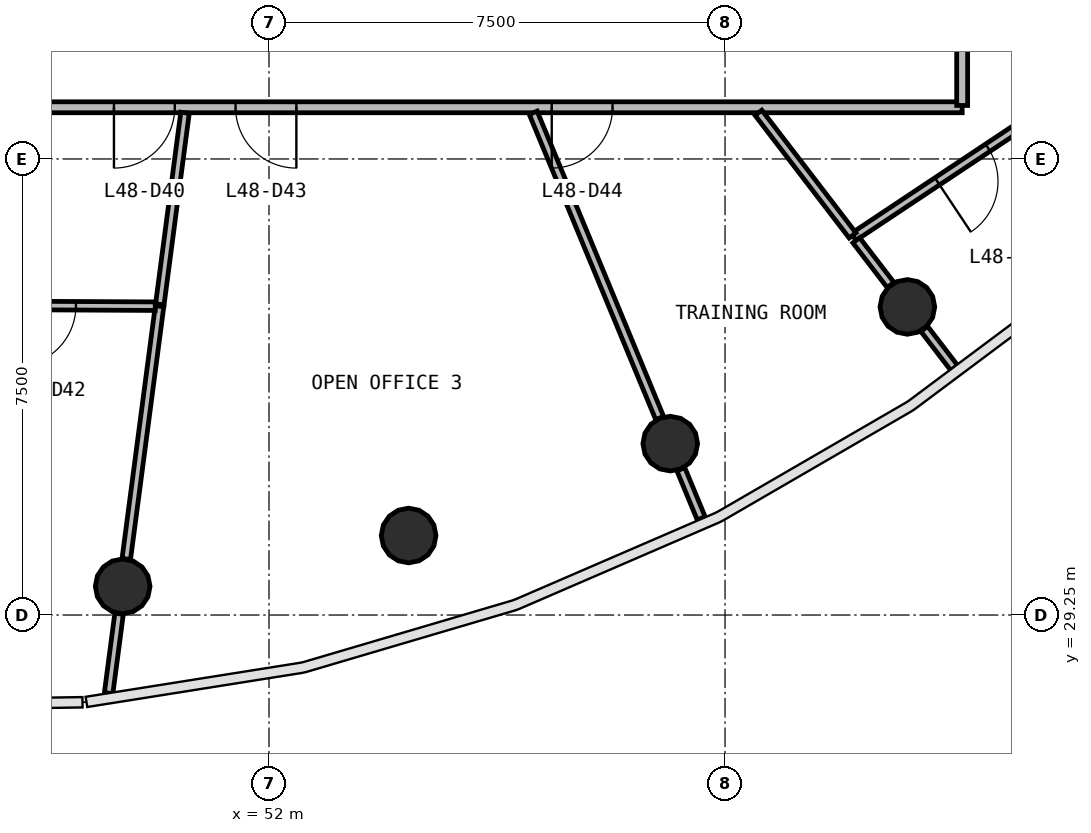
"""IFC4 building model, lengths in metres.
Left out: names, types, materials, properties, quantities, classifications, styles, units other than length and angle.
Written with IfcOpenShell. Run it as: python <this file> out.ifc"""

import sys

from ifc_helpers import new_model, si_unit, direction, frame, frame_2d, origin, origin_2d, place, context, subcontext, project, spatial, rectangle, circle, extrude, source, transform, mapped, element, fill, save


model = new_model("IFC4")
c1 = context("Model", 3, precision=1e-05, world=origin(), true_north=direction((0.0, 1.0)))
c2 = subcontext(c1, "Body", "Model", "MODEL_VIEW")
j1 = project(units=[si_unit("LENGTHUNIT", "METRE"), si_unit("PLANEANGLEUNIT", "RADIAN")], contexts=[c1])
p1 = place(None, origin())
s1 = spatial("IfcSite", under=j1, at=p1, CompositionType="ELEMENT")
p2 = place(p1, origin())
s2 = spatial("IfcBuilding", under=s1, at=p2, CompositionType="ELEMENT")
p3 = place(p2, frame((0.0, 0.0, 199.4)))
s3 = spatial("IfcBuildingStorey", under=s2, at=p3, CompositionType="ELEMENT", Elevation=199.4)
m1 = source(origin(), c2, "Body", "SweptSolid", [
    extrude(circle(Radius=0.45, at=origin_2d()), origin(), (0.0, 0.0, 1.0), 3.9),
])
for number, where, z_axis, x_axis in (
    (1, (49.594, 29.722, 0.0), (0.0, 0.0, 1.0), (1.0, 0.0, 0.0)),
    (2, (54.296, 30.558, 0.0), (0.0, 0.0, 1.0), (1.0, 0.0, 0.0)),
    (3, (58.599, 32.069, 0.0), (0.0, 0.0, 1.0), (1.0, 0.0, 0.0)),
    (4, (62.499, 34.317, 0.0), (0.0, 0.0, 1.0), (1.0, 0.0, 0.0)),
):
    element("IfcColumn", number, at=place(p3, frame(where, z_axis=z_axis, x_axis=x_axis)), inside=s3, PredefinedType="COLUMN", context=c2, shape_type="MappedRepresentation", body=[
        mapped(m1, transform((0.0, 0.0, 0.0), scale=1.0)),
    ])
p4 = place(p3, frame((63.4, 37.6, 0.0), z_axis=(0.0, 0.0, 1.0), x_axis=(-1.0, 0.0, 0.0)))
e5 = element("IfcWall", 5, at=p4, inside=s3, PredefinedType="PARTITIONING", context=c2, shape_type="SweptSolid", body=[
    extrude(rectangle(XDim=22.8, YDim=0.18, at=frame_2d((11.4, 0.0))), origin(), (0.0, 0.0, 1.0), 2.88),
])
p5 = place(p4, frame((12.95, 0.0, 0.0)))
e6 = element("IfcOpeningElement", 6, at=p5, cuts=e5, PredefinedType="OPENING", context=c2, shape_type="SweptSolid", body=[
    extrude(rectangle(XDim=1.0, YDim=2.1, at=frame_2d((0.5, 1.05))), frame((0.0, 0.1, 0.0), z_axis=(0.0, -1.0, 0.0), x_axis=(1.0, 0.0, 0.0)), (0.0, 0.0, 1.0), 0.2),
])
p6 = place(p4, frame((10.95, 0.0, 0.0)))
e7 = element("IfcOpeningElement", 7, at=p6, cuts=e5, PredefinedType="OPENING", context=c2, shape_type="SweptSolid", body=[
    extrude(rectangle(XDim=1.0, YDim=2.1, at=frame_2d((0.5, 1.05))), frame((0.0, 0.1, 0.0), z_axis=(0.0, -1.0, 0.0), x_axis=(1.0, 0.0, 0.0)), (0.0, 0.0, 1.0), 0.2),
])
p7 = place(p4, frame((5.75, 0.0, 0.0)))
e8 = element("IfcOpeningElement", 8, at=p7, cuts=e5, PredefinedType="OPENING", context=c2, shape_type="SweptSolid", body=[
    extrude(rectangle(XDim=1.0, YDim=2.1, at=frame_2d((0.5, 1.05))), frame((0.0, 0.1, 0.0), z_axis=(0.0, -1.0, 0.0), x_axis=(1.0, 0.0, 0.0)), (0.0, 0.0, 1.0), 0.2),
])
p8 = place(p3, frame((63.4, 58.37, 0.0), z_axis=(0.0, 0.0, 1.0), x_axis=(0.0, -1.0, 0.0)))
e9 = element("IfcWall", 9, at=p8, inside=s3, PredefinedType="PARTITIONING", context=c2, shape_type="SweptSolid", body=[
    extrude(rectangle(XDim=20.74, YDim=0.18, at=frame_2d((10.37, 0.0))), origin(), (0.0, 0.0, 1.0), 2.88),
])
p9 = place(p8, frame((9.99, 0.0, 0.0)))
e10 = element("IfcOpeningElement", 10, at=p9, cuts=e9, PredefinedType="OPENING", context=c2, shape_type="SweptSolid", body=[
    extrude(rectangle(XDim=0.9, YDim=2.1, at=frame_2d((0.45, 1.05))), frame((0.0, 0.1, 0.0), z_axis=(0.0, -1.0, 0.0), x_axis=(1.0, 0.0, 0.0)), (0.0, 0.0, 1.0), 0.2),
])
p10 = place(p8, frame((7.79, 0.0, 0.0)))
e11 = element("IfcOpeningElement", 11, at=p10, cuts=e9, PredefinedType="OPENING", context=c2, shape_type="SweptSolid", body=[
    extrude(rectangle(XDim=0.9, YDim=2.1, at=frame_2d((0.45, 1.05))), frame((0.0, 0.1, 0.0), z_axis=(0.0, -1.0, 0.0), x_axis=(1.0, 0.0, 0.0)), (0.0, 0.0, 1.0), 0.2),
])
p11 = place(p8, frame((4.29, 0.0, 0.0)))
e12 = element("IfcOpeningElement", 12, at=p11, cuts=e9, PredefinedType="OPENING", context=c2, shape_type="SweptSolid", body=[
    extrude(rectangle(XDim=1.0, YDim=2.1, at=frame_2d((0.5, 1.05))), frame((0.0, 0.1, 0.0), z_axis=(0.0, -1.0, 0.0), x_axis=(1.0, 0.0, 0.0)), (0.0, 0.0, 1.0), 0.2),
])
p12 = place(p8, frame((12.09, 0.0, 0.0)))
e13 = element("IfcOpeningElement", 13, at=p12, cuts=e9, PredefinedType="OPENING", context=c2, shape_type="SweptSolid", body=[
    extrude(rectangle(XDim=1.0, YDim=2.1, at=frame_2d((0.5, 1.05))), frame((0.0, 0.1, 0.0), z_axis=(0.0, -1.0, 0.0), x_axis=(1.0, 0.0, 0.0)), (0.0, 0.0, 1.0), 0.2),
])
p13 = place(p3, frame((56.345, 37.51, 0.0), z_axis=(0.0, 0.0, 1.0), x_axis=(0.382655972885, -0.923890906122, 0.0)))
e14 = element("IfcWall", 14, at=p13, inside=s3, PredefinedType="PARTITIONING", context=c2, shape_type="SweptSolid", body=[
    extrude(rectangle(XDim=5.435, YDim=0.14, at=frame_2d((2.717, 0.0))), origin(), (0.0, 0.0, 1.0), 2.88),
])
p14 = place(p3, frame((65.214, 37.861, 0.0), z_axis=(0.0, 0.0, 1.0), x_axis=(-0.832762432558, -0.553630500353, 0.0)))
e15 = element("IfcWall", 15, at=p14, inside=s3, PredefinedType="PARTITIONING", context=c2, shape_type="SweptSolid", body=[
    extrude(rectangle(XDim=4.321, YDim=0.14, at=frame_2d((2.16, 0.0))), origin(), (0.0, 0.0, 1.0), 2.88),
])
p15 = place(p14, frame((1.671, 0.0, 0.0)))
e16 = element("IfcOpeningElement", 16, at=p15, cuts=e15, PredefinedType="OPENING", context=c2, shape_type="SweptSolid", body=[
    extrude(rectangle(XDim=1.0, YDim=2.1, at=frame_2d((0.5, 1.05))), frame((0.0, 0.08, 0.0), z_axis=(0.0, -1.0, 0.0), x_axis=(1.0, 0.0, 0.0)), (0.0, 0.0, 1.0), 0.16),
])
p16 = place(p3, frame((50.2, 34.329, 0.0), z_axis=(0.0, 0.0, 1.0), x_axis=(-0.13056900495, -0.991439224031, 0.0)))
e17 = element("IfcWall", 17, at=p16, inside=s3, PredefinedType="PARTITIONING", context=c2, shape_type="SweptSolid", body=[
    extrude(rectangle(XDim=4.192, YDim=0.14, at=frame_2d((2.096, 0.0))), origin(), (0.0, 0.0, 1.0), 2.88),
])
p17 = place(p3, frame((50.13, 34.329, 0.0), z_axis=(0.0, 0.0, 1.0), x_axis=(-0.999987464445, 0.005007090308, 0.0)))
e18 = element("IfcWall", 18, at=p17, inside=s3, PredefinedType="PARTITIONING", context=c2, shape_type="SweptSolid", body=[
    extrude(rectangle(XDim=3.754, YDim=0.14, at=frame_2d((1.877, 0.0))), origin(), (0.0, 0.0, 1.0), 2.88),
])
p18 = place(p17, frame((1.304, 0.0, 0.0)))
e19 = element("IfcOpeningElement", 19, at=p18, cuts=e18, PredefinedType="OPENING", context=c2, shape_type="SweptSolid", body=[
    extrude(rectangle(XDim=1.0, YDim=2.1, at=frame_2d((0.5, 1.05))), frame((0.0, 0.08, 0.0), z_axis=(0.0, -1.0, 0.0), x_axis=(1.0, 0.0, 0.0)), (0.0, 0.0, 1.0), 0.16),
])
p19 = place(p3, frame((50.619, 37.51, 0.0), z_axis=(0.0, 0.0, 1.0), x_axis=(-0.130488286991, -0.991449850955, 0.0)))
e20 = element("IfcWall", 20, at=p19, inside=s3, PredefinedType="PARTITIONING", context=c2, shape_type="SweptSolid", body=[
    extrude(rectangle(XDim=3.179, YDim=0.14, at=frame_2d((1.589, 0.0))), origin(), (0.0, 0.0, 1.0), 2.88),
])
p20 = place(p3, frame((60.049, 37.51, 0.0), z_axis=(0.0, 0.0, 1.0), x_axis=(0.608703571787, -0.793397732348, 0.0)))
e21 = element("IfcWall", 21, at=p20, inside=s3, PredefinedType="PARTITIONING", context=c2, shape_type="SweptSolid", body=[
    extrude(rectangle(XDim=2.543, YDim=0.14, at=frame_2d((1.271, 0.0))), origin(), (0.0, 0.0, 1.0), 2.88),
])
p21 = place(p3, frame((49.534, 29.271, 0.0), z_axis=(0.0, 0.0, 1.0), x_axis=(-0.13056005306, -0.991440402921, 0.0)))
e22 = element("IfcWall", 22, at=p21, inside=s3, PredefinedType="PARTITIONING", context=c2, shape_type="SweptSolid", body=[
    extrude(rectangle(XDim=1.316, YDim=0.14, at=frame_2d((0.658, 0.0))), origin(), (0.0, 0.0, 1.0), 2.88),
])
p22 = place(p3, frame((61.658, 35.413, 0.0), z_axis=(0.0, 0.0, 1.0), x_axis=(0.60873011284, -0.79337736905, 0.0)))
e23 = element("IfcWall", 23, at=p22, inside=s3, PredefinedType="PARTITIONING", context=c2, shape_type="SweptSolid", body=[
    extrude(rectangle(XDim=0.927, YDim=0.14, at=frame_2d((0.463, 0.0))), origin(), (0.0, 0.0, 1.0), 2.88),
])
p23 = place(p3, frame((58.773, 31.648, 0.0), z_axis=(0.0, 0.0, 1.0), x_axis=(0.382672260774, -0.923884159857, 0.0)))
e24 = element("IfcWall", 24, at=p23, inside=s3, PredefinedType="PARTITIONING", context=c2, shape_type="SweptSolid", body=[
    extrude(rectangle(XDim=0.875, YDim=0.14, at=frame_2d((0.438, 0.0))), origin(), (0.0, 0.0, 1.0), 2.88),
])
p24 = place(p3, frame((62.776, 33.956, 0.0), z_axis=(0.0, 0.0, 1.0), x_axis=(0.60901253632, -0.793160595721, 0.0)))
e25 = element("IfcWall", 25, at=p24, inside=s3, PredefinedType="PARTITIONING", context=c2, shape_type="SweptSolid", body=[
    extrude(rectangle(XDim=0.811, YDim=0.14, at=frame_2d((0.406, 0.0))), origin(), (0.0, 0.0, 1.0), 2.88),
])
m2 = source(origin(), c2, "Body", "SweptSolid", [
    extrude(rectangle(XDim=1.0, YDim=2.1, at=frame_2d((0.5, 1.05))), frame((0.0, 0.025, 0.0), z_axis=(0.0, -1.0, 0.0), x_axis=(1.0, 0.0, 0.0)), (0.0, 0.0, 1.0), 0.05),
])
p25 = place(p5, origin())
e26 = element("IfcDoor", 26, at=p25, inside=s3, OperationType="SINGLE_SWING_RIGHT", PredefinedType="DOOR", context=c2, shape_type="MappedRepresentation", body=[
    mapped(m2, transform((0.0, 0.0, 0.0), scale=1.0)),
])
fill(e6, e26)
p26 = place(p18, origin())
e27 = element("IfcDoor", 27, at=p26, inside=s3, OperationType="SINGLE_SWING_RIGHT", PredefinedType="DOOR", context=c2, shape_type="MappedRepresentation", body=[
    mapped(m2, transform((0.0, 0.0, 0.0), scale=1.0)),
])
fill(e19, e27)
p27 = place(p6, origin())
e28 = element("IfcDoor", 28, at=p27, inside=s3, OperationType="SINGLE_SWING_LEFT", PredefinedType="DOOR", context=c2, shape_type="MappedRepresentation", body=[
    mapped(m2, transform((0.0, 0.0, 0.0), scale=1.0)),
])
fill(e7, e28)
p28 = place(p7, origin())
e29 = element("IfcDoor", 29, at=p28, inside=s3, OperationType="SINGLE_SWING_RIGHT", PredefinedType="DOOR", context=c2, shape_type="MappedRepresentation", body=[
    mapped(m2, transform((0.0, 0.0, 0.0), scale=1.0)),
])
fill(e8, e29)
p29 = place(p15, origin())
e30 = element("IfcDoor", 30, at=p29, inside=s3, OperationType="SINGLE_SWING_RIGHT", PredefinedType="DOOR", context=c2, shape_type="MappedRepresentation", body=[
    mapped(m2, transform((0.0, 0.0, 0.0), scale=1.0)),
])
fill(e16, e30)
save(model, sys.argv[1])
